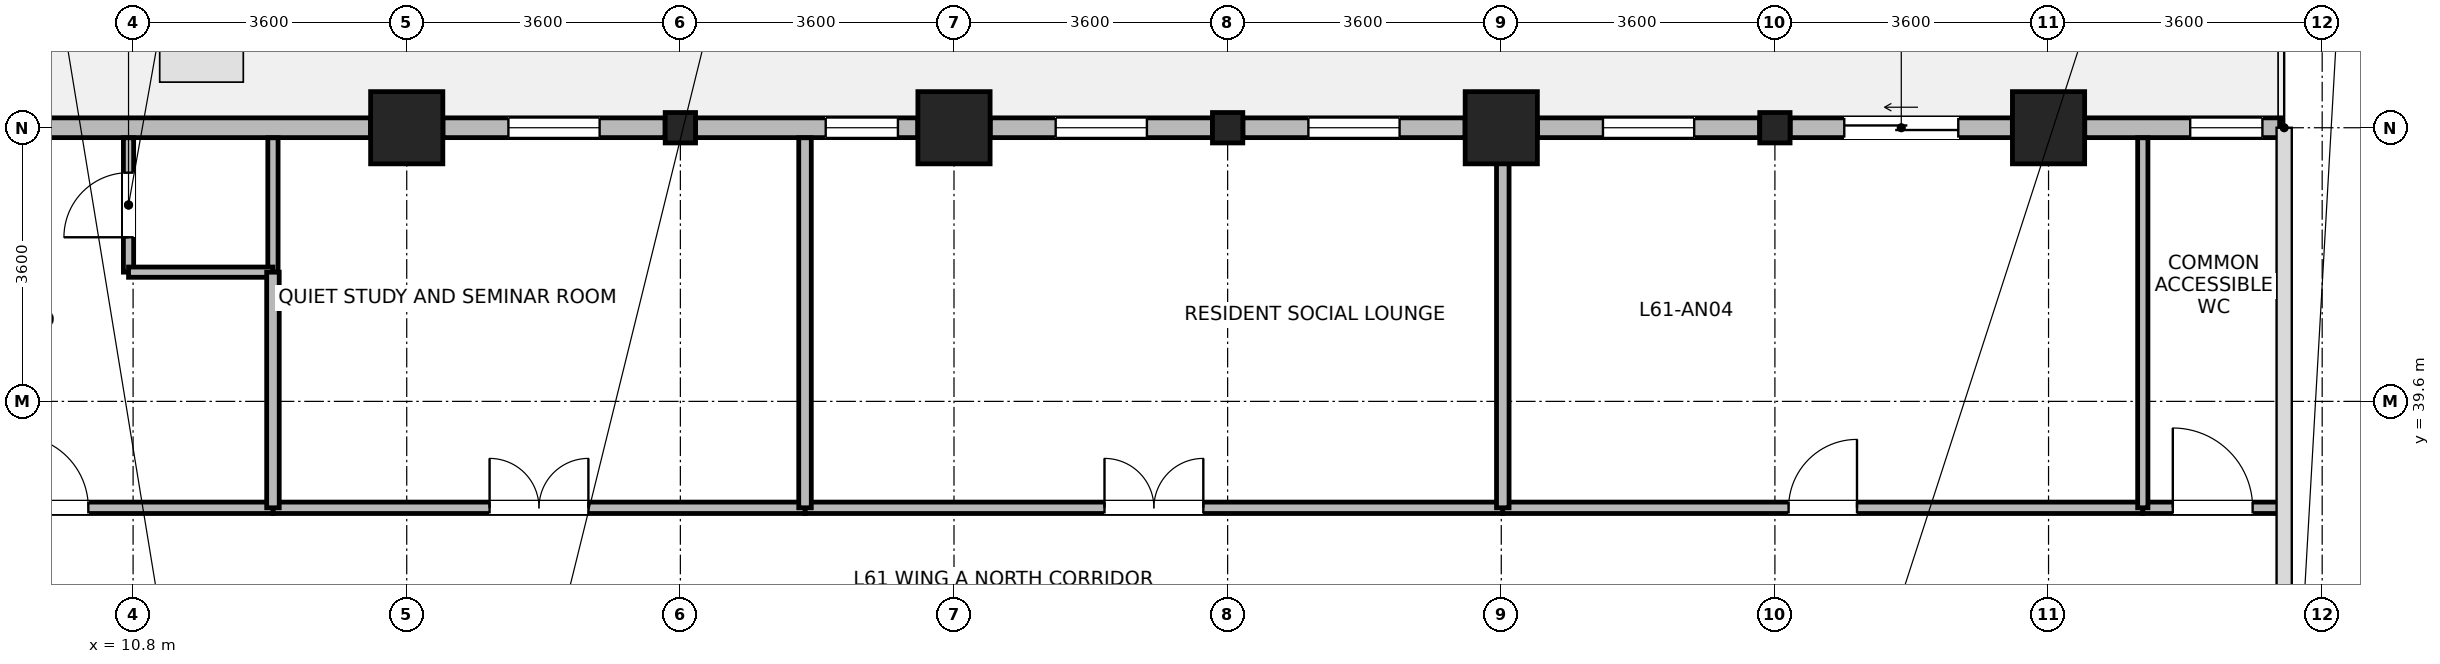
"""IFC4 building model, lengths in metres.
Left out: names, types, materials, properties, quantities, classifications, styles, units other than length and angle.
Written with IfcOpenShell. Run it as: python <this file> out.ifc"""

import sys

from ifc_helpers import new_model, si_unit, direction, frame, frame_2d, origin, origin_2d, place, context, subcontext, project, spatial, rectangle, i_section, extrude, source, transform, mapped, element, fill, save


model = new_model("IFC4")
c1 = context("Model", 3, precision=1e-05, world=origin(), true_north=direction((0.0, 1.0)))
c2 = subcontext(c1, "Body", "Model", "MODEL_VIEW")
j1 = project(units=[si_unit("LENGTHUNIT", "METRE"), si_unit("PLANEANGLEUNIT", "RADIAN")], contexts=[c1])
p1 = place(None, origin())
s1 = spatial("IfcSite", under=j1, at=p1, CompositionType="ELEMENT")
p2 = place(p1, origin())
s2 = spatial("IfcBuilding", under=s1, at=p2, CompositionType="ELEMENT")
p3 = place(p2, frame((0.0, 0.0, 238.8)))
s3 = spatial("IfcBuildingStorey", under=s2, at=p3, CompositionType="ELEMENT", Elevation=238.8)
m1 = source(origin(), c2, "Body", "SweptSolid", [
    extrude(rectangle(XDim=0.95, YDim=0.95, at=origin_2d()), origin(), (0.0, 0.0, 1.0), 3.7),
])
for number, where, z_axis, x_axis in (
    (1, (14.4, 43.2, 0.0), (0.0, 0.0, 1.0), (1.0, 0.0, 0.0)),
    (2, (21.6, 43.2, 0.0), (0.0, 0.0, 1.0), (1.0, 0.0, 0.0)),
    (3, (28.8, 43.2, 0.0), (0.0, 0.0, 1.0), (1.0, 0.0, 0.0)),
    (4, (36.0, 43.2, 0.0), (0.0, 0.0, 1.0), (1.0, 0.0, 0.0)),
):
    element("IfcColumn", number, at=place(p3, frame(where, z_axis=z_axis, x_axis=x_axis)), inside=s3, PredefinedType="COLUMN", context=c2, shape_type="MappedRepresentation", body=[
        mapped(m1, transform((0.0, 0.0, 0.0), x_axis=(1.0, 0.0, 0.0), y_axis=(0.0, 1.0, 0.0), z_axis=(0.0, 0.0, 1.0), scale=1.0)),
    ])
m2 = source(origin(), c2, "Body", "SweptSolid", [
    extrude(i_section(OverallWidth=0.399, OverallDepth=0.4, WebThickness=0.017, FlangeThickness=0.023, FilletRadius=0.015, at=origin_2d()), origin(), (0.0, 0.0, 1.0), 3.7),
])
for number, where, z_axis, x_axis in (
    (5, (18.0, 43.2, 0.0), (0.0, 0.0, 1.0), (1.0, 0.0, 0.0)),
    (6, (25.2, 43.2, 0.0), (0.0, 0.0, 1.0), (1.0, 0.0, 0.0)),
    (7, (32.4, 43.2, 0.0), (0.0, 0.0, 1.0), (1.0, 0.0, 0.0)),
):
    element("IfcColumn", number, at=place(p3, frame(where, z_axis=z_axis, x_axis=x_axis)), inside=s3, PredefinedType="COLUMN", context=c2, shape_type="MappedRepresentation", body=[
        mapped(m2, transform((0.0, 0.0, 0.0), x_axis=(1.0, 0.0, 0.0), y_axis=(0.0, 1.0, 0.0), z_axis=(0.0, 0.0, 1.0), scale=1.0)),
    ])
p4 = place(p3, frame((36.476, 43.2, 0.0), z_axis=(0.0, 0.0, 1.0), x_axis=(1.0, 0.0, 0.0)))
e8 = element("IfcWall", 8, at=p4, inside=s3, PredefinedType="STANDARD", context=c2, shape_type="SweptSolid", body=[
    extrude(rectangle(XDim=2.587, YDim=0.26, at=frame_2d((1.293, 0.0))), origin(), (0.0, 0.0, 1.0), 3.42),
])
p5 = place(p4, frame((1.388, 0.0, 0.85)))
e9 = element("IfcOpeningElement", 9, at=p5, cuts=e8, PredefinedType="OPENING", context=c2, shape_type="SweptSolid", body=[
    extrude(rectangle(XDim=0.95, YDim=1.75, at=frame_2d((0.475, 0.875))), frame((0.0, 0.14, 0.0), z_axis=(0.0, -1.0, 0.0), x_axis=(1.0, 0.0, 0.0)), (0.0, 0.0, 1.0), 0.28),
])
p6 = place(p3, frame((32.601, 43.2, 0.0), z_axis=(0.0, 0.0, 1.0), x_axis=(1.0, 0.0, 0.0)))
e10 = element("IfcWall", 10, at=p6, inside=s3, PredefinedType="STANDARD", context=c2, shape_type="SweptSolid", body=[
    extrude(rectangle(XDim=2.923, YDim=0.26, at=frame_2d((1.462, 0.0))), origin(), (0.0, 0.0, 1.0), 3.02),
])
p7 = place(p6, frame((0.712, 0.0, 0.0)))
e11 = element("IfcOpeningElement", 11, at=p7, cuts=e10, PredefinedType="OPENING", context=c2, shape_type="SweptSolid", body=[
    extrude(rectangle(XDim=1.5, YDim=2.15, at=frame_2d((0.75, 1.075))), frame((0.0, 0.14, 0.0), z_axis=(0.0, -1.0, 0.0), x_axis=(1.0, 0.0, 0.0)), (0.0, 0.0, 1.0), 0.28),
])
p8 = place(p3, frame((29.276, 43.2, 0.0), z_axis=(0.0, 0.0, 1.0), x_axis=(1.0, 0.0, 0.0)))
e12 = element("IfcWall", 12, at=p8, inside=s3, PredefinedType="STANDARD", context=c2, shape_type="SweptSolid", body=[
    extrude(rectangle(XDim=2.924, YDim=0.26, at=frame_2d((1.462, 0.0))), origin(), (0.0, 0.0, 1.0), 3.02),
])
p9 = place(p8, frame((0.862, 0.0, 0.85)))
e13 = element("IfcOpeningElement", 13, at=p9, cuts=e12, PredefinedType="OPENING", context=c2, shape_type="SweptSolid", body=[
    extrude(rectangle(XDim=1.2, YDim=1.75, at=frame_2d((0.6, 0.875))), frame((0.0, 0.14, 0.0), z_axis=(0.0, -1.0, 0.0), x_axis=(1.0, 0.0, 0.0)), (0.0, 0.0, 1.0), 0.28),
])
p10 = place(p3, frame((25.4, 43.2, 0.0), z_axis=(0.0, 0.0, 1.0), x_axis=(1.0, 0.0, 0.0)))
e14 = element("IfcWall", 14, at=p10, inside=s3, PredefinedType="STANDARD", context=c2, shape_type="SweptSolid", body=[
    extrude(rectangle(XDim=2.924, YDim=0.26, at=frame_2d((1.462, 0.0))), origin(), (0.0, 0.0, 1.0), 3.02),
])
p11 = place(p10, frame((0.862, 0.0, 0.85)))
e15 = element("IfcOpeningElement", 15, at=p11, cuts=e14, PredefinedType="OPENING", context=c2, shape_type="SweptSolid", body=[
    extrude(rectangle(XDim=1.2, YDim=1.75, at=frame_2d((0.6, 0.875))), frame((0.0, 0.14, 0.0), z_axis=(0.0, -1.0, 0.0), x_axis=(1.0, 0.0, 0.0)), (0.0, 0.0, 1.0), 0.28),
])
p12 = place(p3, frame((22.076, 43.2, 0.0), z_axis=(0.0, 0.0, 1.0), x_axis=(1.0, 0.0, 0.0)))
e16 = element("IfcWall", 16, at=p12, inside=s3, PredefinedType="STANDARD", context=c2, shape_type="SweptSolid", body=[
    extrude(rectangle(XDim=2.924, YDim=0.26, at=frame_2d((1.462, 0.0))), origin(), (0.0, 0.0, 1.0), 3.02),
])
p13 = place(p12, frame((0.862, 0.0, 0.85)))
e17 = element("IfcOpeningElement", 17, at=p13, cuts=e16, PredefinedType="OPENING", context=c2, shape_type="SweptSolid", body=[
    extrude(rectangle(XDim=1.2, YDim=1.75, at=frame_2d((0.6, 0.875))), frame((0.0, 0.14, 0.0), z_axis=(0.0, -1.0, 0.0), x_axis=(1.0, 0.0, 0.0)), (0.0, 0.0, 1.0), 0.28),
])
p14 = place(p3, frame((18.2, 43.2, 0.0), z_axis=(0.0, 0.0, 1.0), x_axis=(1.0, 0.0, 0.0)))
e18 = element("IfcWall", 18, at=p14, inside=s3, PredefinedType="STANDARD", context=c2, shape_type="SweptSolid", body=[
    extrude(rectangle(XDim=2.924, YDim=0.26, at=frame_2d((1.462, 0.0))), origin(), (0.0, 0.0, 1.0), 3.02),
])
p15 = place(p14, frame((1.712, 0.0, 0.85)))
e19 = element("IfcOpeningElement", 19, at=p15, cuts=e18, PredefinedType="OPENING", context=c2, shape_type="SweptSolid", body=[
    extrude(rectangle(XDim=0.95, YDim=1.75, at=frame_2d((0.475, 0.875))), frame((0.0, 0.14, 0.0), z_axis=(0.0, -1.0, 0.0), x_axis=(1.0, 0.0, 0.0)), (0.0, 0.0, 1.0), 0.28),
])
p16 = place(p3, frame((14.876, 43.2, 0.0), z_axis=(0.0, 0.0, 1.0), x_axis=(1.0, 0.0, 0.0)))
e20 = element("IfcWall", 20, at=p16, inside=s3, PredefinedType="STANDARD", context=c2, shape_type="SweptSolid", body=[
    extrude(rectangle(XDim=2.924, YDim=0.26, at=frame_2d((1.462, 0.0))), origin(), (0.0, 0.0, 1.0), 3.02),
])
p17 = place(p16, frame((0.862, 0.0, 0.85)))
e21 = element("IfcOpeningElement", 21, at=p17, cuts=e20, PredefinedType="OPENING", context=c2, shape_type="SweptSolid", body=[
    extrude(rectangle(XDim=1.2, YDim=1.75, at=frame_2d((0.6, 0.875))), frame((0.0, 0.14, 0.0), z_axis=(0.0, -1.0, 0.0), x_axis=(1.0, 0.0, 0.0)), (0.0, 0.0, 1.0), 0.28),
])
p18 = place(p3, frame((6.835, 43.2, 0.0), z_axis=(0.0, 0.0, 1.0), x_axis=(1.0, 0.0, 0.0)))
e22 = element("IfcWall", 22, at=p18, inside=s3, PredefinedType="STANDARD", context=c2, shape_type="SweptSolid", body=[
    extrude(rectangle(XDim=7.089, YDim=0.26, at=frame_2d((3.544, 0.0))), origin(), (0.0, 0.0, 1.0), 3.42),
])
p19 = place(p18, frame((1.172, 0.0, 0.85)))
e23 = element("IfcOpeningElement", 23, at=p19, cuts=e22, PredefinedType="OPENING", context=c2, shape_type="SweptSolid", body=[
    extrude(rectangle(XDim=1.2, YDim=1.75, at=frame_2d((0.6, 0.875))), frame((0.0, 0.14, 0.0), z_axis=(0.0, -1.0, 0.0), x_axis=(1.0, 0.0, 0.0)), (0.0, 0.0, 1.0), 0.28),
])
p20 = place(p3, frame((10.74, 41.3, 0.0), z_axis=(0.0, 0.0, 1.0), x_axis=(0.0, 1.0, 0.0)))
e24 = element("IfcWall", 24, at=p20, inside=s3, PredefinedType="PARTITIONING", context=c2, shape_type="SweptSolid", body=[
    extrude(rectangle(XDim=1.768, YDim=0.135, at=frame_2d((0.884, 0.0))), origin(), (0.0, 0.0, 1.0), 3.42),
])
p21 = place(p20, frame((0.459, 0.0, 0.0)))
e25 = element("IfcOpeningElement", 25, at=p21, cuts=e24, PredefinedType="OPENING", context=c2, shape_type="SweptSolid", body=[
    extrude(rectangle(XDim=0.85, YDim=2.04, at=frame_2d((0.425, 1.02))), frame((0.0, 0.078, 0.0), z_axis=(0.0, -1.0, 0.0), x_axis=(1.0, 0.0, 0.0)), (0.0, 0.0, 1.0), 0.155),
])
p22 = place(p3, frame((12.64, 41.3, 0.0), z_axis=(0.0, 0.0, 1.0), x_axis=(0.0, 1.0, 0.0)))
e26 = element("IfcWall", 26, at=p22, inside=s3, PredefinedType="PARTITIONING", context=c2, shape_type="SweptSolid", body=[
    extrude(rectangle(XDim=1.768, YDim=0.135, at=frame_2d((0.884, 0.0))), origin(), (0.0, 0.0, 1.0), 3.42),
])
p23 = place(p3, frame((10.74, 41.3, 0.0), z_axis=(0.0, 0.0, 1.0), x_axis=(1.0, 0.0, 0.0)))
e27 = element("IfcWall", 27, at=p23, inside=s3, PredefinedType="PARTITIONING", context=c2, shape_type="SweptSolid", body=[
    extrude(rectangle(XDim=1.9, YDim=0.135, at=frame_2d((0.95, 0.0))), origin(), (0.0, 0.0, 1.0), 3.42),
])
p24 = place(p3, frame((19.64, 38.2, 0.0), z_axis=(0.0, 0.0, 1.0), x_axis=(1.0, 0.0, 0.0)))
e28 = element("IfcWall", 28, at=p24, inside=s3, PredefinedType="PARTITIONING", context=c2, shape_type="SweptSolid", body=[
    extrude(rectangle(XDim=9.18, YDim=0.15, at=frame_2d((4.59, 0.0))), origin(), (0.0, 0.0, 1.0), 3.42),
])
p25 = place(p24, frame((3.94, 0.0, 0.0)))
e29 = element("IfcOpeningElement", 29, at=p25, cuts=e28, PredefinedType="OPENING", context=c2, shape_type="SweptSolid", body=[
    extrude(rectangle(XDim=1.3, YDim=2.12, at=frame_2d((0.65, 1.06))), frame((0.0, 0.085, 0.0), z_axis=(0.0, -1.0, 0.0), x_axis=(1.0, 0.0, 0.0)), (0.0, 0.0, 1.0), 0.17),
])
p26 = place(p3, frame((28.82, 38.2, 0.0), z_axis=(0.0, 0.0, 1.0), x_axis=(1.0, 0.0, 0.0)))
e30 = element("IfcWall", 30, at=p26, inside=s3, PredefinedType="PARTITIONING", context=c2, shape_type="SweptSolid", body=[
    extrude(rectangle(XDim=8.42, YDim=0.15, at=frame_2d((4.21, 0.0))), origin(), (0.0, 0.0, 1.0), 3.42),
])
p27 = place(p26, frame((3.76, 0.0, 0.0)))
e31 = element("IfcOpeningElement", 31, at=p27, cuts=e30, PredefinedType="OPENING", context=c2, shape_type="SweptSolid", body=[
    extrude(rectangle(XDim=0.9, YDim=2.08, at=frame_2d((0.45, 1.04))), frame((0.0, 0.085, 0.0), z_axis=(0.0, -1.0, 0.0), x_axis=(1.0, 0.0, 0.0)), (0.0, 0.0, 1.0), 0.17),
])
p28 = place(p3, frame((12.64, 38.2, 0.0), z_axis=(0.0, 0.0, 1.0), x_axis=(1.0, 0.0, 0.0)))
e32 = element("IfcWall", 32, at=p28, inside=s3, PredefinedType="PARTITIONING", context=c2, shape_type="SweptSolid", body=[
    extrude(rectangle(XDim=7.0, YDim=0.15, at=frame_2d((3.5, 0.0))), origin(), (0.0, 0.0, 1.0), 3.42),
])
p29 = place(p28, frame((2.85, 0.0, 0.0)))
e33 = element("IfcOpeningElement", 33, at=p29, cuts=e32, PredefinedType="OPENING", context=c2, shape_type="SweptSolid", body=[
    extrude(rectangle(XDim=1.3, YDim=2.12, at=frame_2d((0.65, 1.06))), frame((0.0, 0.085, 0.0), z_axis=(0.0, -1.0, 0.0), x_axis=(1.0, 0.0, 0.0)), (0.0, 0.0, 1.0), 0.17),
])
p30 = place(p3, frame((6.832, 38.2, 0.0), z_axis=(0.0, 0.0, 1.0), x_axis=(1.0, 0.0, 0.0)))
e34 = element("IfcWall", 34, at=p30, inside=s3, PredefinedType="PARTITIONING", context=c2, shape_type="SweptSolid", body=[
    extrude(rectangle(XDim=5.808, YDim=0.15, at=frame_2d((2.904, 0.0))), origin(), (0.0, 0.0, 1.0), 3.42),
])
p31 = place(p30, frame((2.429, 0.0, 0.0)))
e35 = element("IfcOpeningElement", 35, at=p31, cuts=e34, PredefinedType="OPENING", context=c2, shape_type="SweptSolid", body=[
    extrude(rectangle(XDim=0.95, YDim=2.1, at=frame_2d((0.475, 1.05))), frame((0.0, 0.085, 0.0), z_axis=(0.0, -1.0, 0.0), x_axis=(1.0, 0.0, 0.0)), (0.0, 0.0, 1.0), 0.17),
])
p32 = place(p3, frame((37.24, 38.2, 0.0), z_axis=(0.0, 0.0, 1.0), x_axis=(1.0, 0.0, 0.0)))
e36 = element("IfcWall", 36, at=p32, inside=s3, PredefinedType="PARTITIONING", context=c2, shape_type="SweptSolid", body=[
    extrude(rectangle(XDim=1.84, YDim=0.15, at=frame_2d((0.92, 0.0))), origin(), (0.0, 0.0, 1.0), 3.42),
])
p33 = place(p32, frame((0.395, 0.0, 0.0)))
e37 = element("IfcOpeningElement", 37, at=p33, cuts=e36, PredefinedType="OPENING", context=c2, shape_type="SweptSolid", body=[
    extrude(rectangle(XDim=1.05, YDim=2.12, at=frame_2d((0.525, 1.06))), frame((0.0, 0.085, 0.0), z_axis=(0.0, -1.0, 0.0), x_axis=(1.0, 0.0, 0.0)), (0.0, 0.0, 1.0), 0.17),
])
p34 = place(p3, frame((19.64, 38.2, 0.0), z_axis=(0.0, 0.0, 1.0), x_axis=(0.0, 1.0, 0.0)))
e38 = element("IfcWall", 38, at=p34, inside=s3, PredefinedType="PARTITIONING", context=c2, shape_type="SweptSolid", body=[
    extrude(rectangle(XDim=4.868, YDim=0.165, at=frame_2d((2.434, 0.0))), origin(), (0.0, 0.0, 1.0), 3.42),
])
p35 = place(p3, frame((28.82, 38.2, 0.0), z_axis=(0.0, 0.0, 1.0), x_axis=(0.0, 1.0, 0.0)))
e39 = element("IfcWall", 39, at=p35, inside=s3, PredefinedType="PARTITIONING", context=c2, shape_type="SweptSolid", body=[
    extrude(rectangle(XDim=4.868, YDim=0.165, at=frame_2d((2.434, 0.0))), origin(), (0.0, 0.0, 1.0), 2.97),
])
p36 = place(p3, frame((37.24, 38.2, 0.0), z_axis=(0.0, 0.0, 1.0), x_axis=(0.0, 1.0, 0.0)))
e40 = element("IfcWall", 40, at=p36, inside=s3, PredefinedType="PARTITIONING", context=c2, shape_type="SweptSolid", body=[
    extrude(rectangle(XDim=4.868, YDim=0.135, at=frame_2d((2.434, 0.0))), origin(), (0.0, 0.0, 1.0), 3.42),
])
p37 = place(p3, frame((12.64, 38.2, 0.0), z_axis=(0.0, 0.0, 1.0), x_axis=(0.0, 1.0, 0.0)))
e41 = element("IfcWall", 41, at=p37, inside=s3, PredefinedType="PARTITIONING", context=c2, shape_type="SweptSolid", body=[
    extrude(rectangle(XDim=3.1, YDim=0.165, at=frame_2d((1.55, 0.0))), origin(), (0.0, 0.0, 1.0), 3.42),
])
p38 = place(p5, origin())
e42 = element("IfcWindow", 42, at=p38, inside=s3, PartitioningType="SINGLE_PANEL", PredefinedType="WINDOW", context=c2, shape_type="SweptSolid", body=[
    extrude(rectangle(XDim=0.95, YDim=1.75, at=frame_2d((0.475, 0.875))), frame((0.0, 0.03, 0.0), z_axis=(0.0, -1.0, 0.0), x_axis=(1.0, 0.0, 0.0)), (0.0, 0.0, 1.0), 0.06),
])
fill(e9, e42)
p39 = place(p7, origin())
e43 = element("IfcDoor", 43, at=p39, inside=s3, OperationType="SLIDING_TO_LEFT", PredefinedType="DOOR", context=c2, shape_type="SweptSolid", body=[
    extrude(rectangle(XDim=1.5, YDim=2.15, at=frame_2d((0.75, 1.075))), frame((0.0, 0.025, 0.0), z_axis=(0.0, -1.0, 0.0), x_axis=(1.0, 0.0, 0.0)), (0.0, 0.0, 1.0), 0.05),
])
fill(e11, e43)
p40 = place(p9, origin())
e44 = element("IfcWindow", 44, at=p40, inside=s3, PartitioningType="SINGLE_PANEL", PredefinedType="WINDOW", context=c2, shape_type="SweptSolid", body=[
    extrude(rectangle(XDim=1.2, YDim=1.75, at=frame_2d((0.6, 0.875))), frame((0.0, 0.03, 0.0), z_axis=(0.0, -1.0, 0.0), x_axis=(1.0, 0.0, 0.0)), (0.0, 0.0, 1.0), 0.06),
])
fill(e13, e44)
p41 = place(p11, origin())
e45 = element("IfcWindow", 45, at=p41, inside=s3, PartitioningType="SINGLE_PANEL", PredefinedType="WINDOW", context=c2, shape_type="SweptSolid", body=[
    extrude(rectangle(XDim=1.2, YDim=1.75, at=frame_2d((0.6, 0.875))), frame((0.0, 0.03, 0.0), z_axis=(0.0, -1.0, 0.0), x_axis=(1.0, 0.0, 0.0)), (0.0, 0.0, 1.0), 0.06),
])
fill(e15, e45)
p42 = place(p13, origin())
e46 = element("IfcWindow", 46, at=p42, inside=s3, PartitioningType="SINGLE_PANEL", PredefinedType="WINDOW", context=c2, shape_type="SweptSolid", body=[
    extrude(rectangle(XDim=1.2, YDim=1.75, at=frame_2d((0.6, 0.875))), frame((0.0, 0.03, 0.0), z_axis=(0.0, -1.0, 0.0), x_axis=(1.0, 0.0, 0.0)), (0.0, 0.0, 1.0), 0.06),
])
fill(e17, e46)
p43 = place(p15, origin())
e47 = element("IfcWindow", 47, at=p43, inside=s3, PartitioningType="SINGLE_PANEL", PredefinedType="WINDOW", context=c2, shape_type="SweptSolid", body=[
    extrude(rectangle(XDim=0.95, YDim=1.75, at=frame_2d((0.475, 0.875))), frame((0.0, 0.03, 0.0), z_axis=(0.0, -1.0, 0.0), x_axis=(1.0, 0.0, 0.0)), (0.0, 0.0, 1.0), 0.06),
])
fill(e19, e47)
p44 = place(p17, origin())
e48 = element("IfcWindow", 48, at=p44, inside=s3, PartitioningType="SINGLE_PANEL", PredefinedType="WINDOW", context=c2, shape_type="SweptSolid", body=[
    extrude(rectangle(XDim=1.2, YDim=1.75, at=frame_2d((0.6, 0.875))), frame((0.0, 0.03, 0.0), z_axis=(0.0, -1.0, 0.0), x_axis=(1.0, 0.0, 0.0)), (0.0, 0.0, 1.0), 0.06),
])
fill(e21, e48)
p45 = place(p21, origin())
e49 = element("IfcDoor", 49, at=p45, inside=s3, OperationType="SINGLE_SWING_LEFT", PredefinedType="DOOR", context=c2, shape_type="SweptSolid", body=[
    extrude(rectangle(XDim=0.85, YDim=2.04, at=frame_2d((0.425, 1.02))), frame((0.0, 0.025, 0.0), z_axis=(0.0, -1.0, 0.0), x_axis=(1.0, 0.0, 0.0)), (0.0, 0.0, 1.0), 0.05),
])
fill(e25, e49)
p46 = place(p25, origin())
e50 = element("IfcDoor", 50, at=p46, inside=s3, OperationType="DOUBLE_DOOR_SINGLE_SWING", PredefinedType="DOOR", context=c2, shape_type="SweptSolid", body=[
    extrude(rectangle(XDim=1.3, YDim=2.12, at=frame_2d((0.65, 1.06))), frame((0.0, 0.025, 0.0), z_axis=(0.0, -1.0, 0.0), x_axis=(1.0, 0.0, 0.0)), (0.0, 0.0, 1.0), 0.05),
])
fill(e29, e50)
p47 = place(p27, origin())
e51 = element("IfcDoor", 51, at=p47, inside=s3, OperationType="SINGLE_SWING_RIGHT", PredefinedType="DOOR", context=c2, shape_type="SweptSolid", body=[
    extrude(rectangle(XDim=0.9, YDim=2.08, at=frame_2d((0.45, 1.04))), frame((0.0, 0.025, 0.0), z_axis=(0.0, -1.0, 0.0), x_axis=(1.0, 0.0, 0.0)), (0.0, 0.0, 1.0), 0.05),
])
fill(e31, e51)
p48 = place(p29, origin())
e52 = element("IfcDoor", 52, at=p48, inside=s3, OperationType="DOUBLE_DOOR_SINGLE_SWING", PredefinedType="DOOR", context=c2, shape_type="SweptSolid", body=[
    extrude(rectangle(XDim=1.3, YDim=2.12, at=frame_2d((0.65, 1.06))), frame((0.0, 0.025, 0.0), z_axis=(0.0, -1.0, 0.0), x_axis=(1.0, 0.0, 0.0)), (0.0, 0.0, 1.0), 0.05),
])
fill(e33, e52)
p49 = place(p31, origin())
e53 = element("IfcDoor", 53, at=p49, inside=s3, OperationType="SINGLE_SWING_LEFT", PredefinedType="DOOR", context=c2, shape_type="SweptSolid", body=[
    extrude(rectangle(XDim=0.95, YDim=2.1, at=frame_2d((0.475, 1.05))), frame((0.0, 0.025, 0.0), z_axis=(0.0, -1.0, 0.0), x_axis=(1.0, 0.0, 0.0)), (0.0, 0.0, 1.0), 0.05),
])
fill(e35, e53)
p50 = place(p33, origin())
e54 = element("IfcDoor", 54, at=p50, inside=s3, OperationType="SINGLE_SWING_LEFT", PredefinedType="DOOR", context=c2, shape_type="SweptSolid", body=[
    extrude(rectangle(XDim=1.05, YDim=2.12, at=frame_2d((0.525, 1.06))), frame((0.0, 0.025, 0.0), z_axis=(0.0, -1.0, 0.0), x_axis=(1.0, 0.0, 0.0)), (0.0, 0.0, 1.0), 0.05),
])
fill(e37, e54)
save(model, sys.argv[1])
